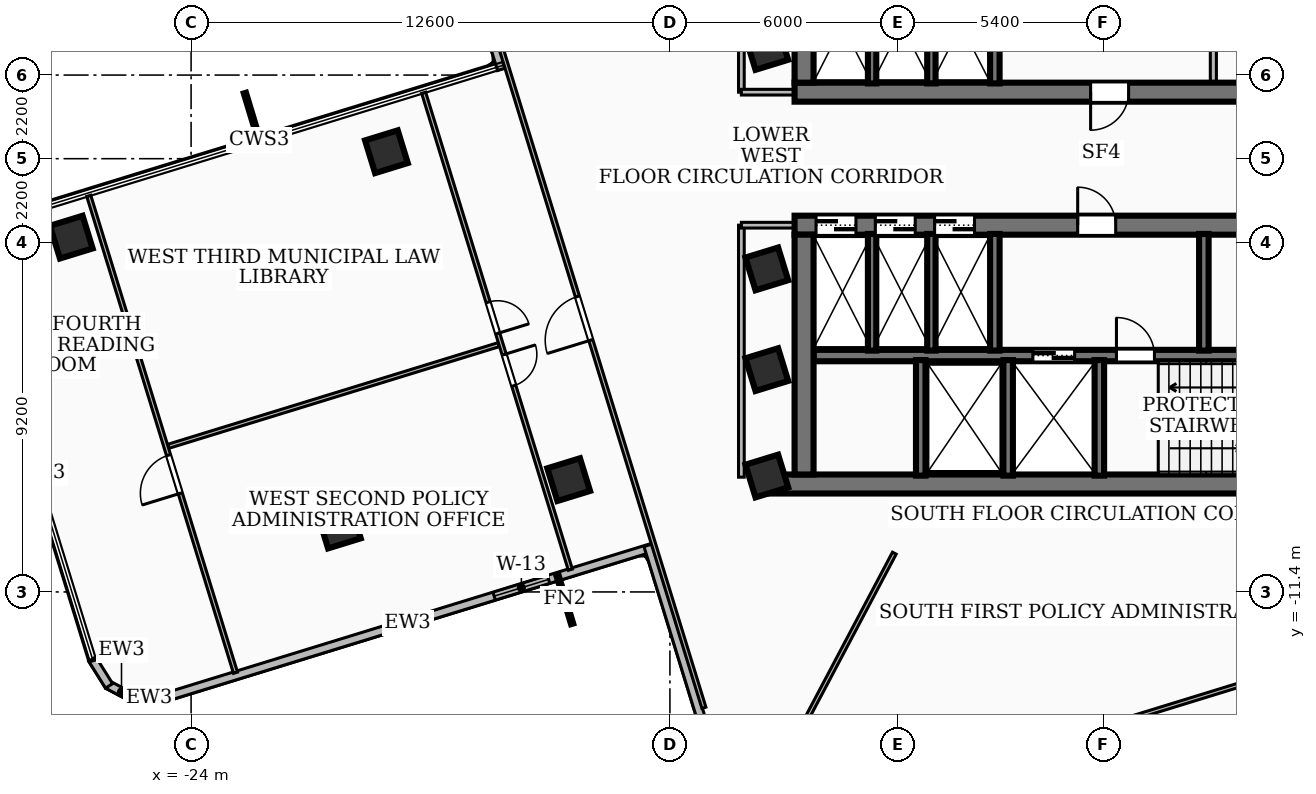
"""IFC4 building model, lengths in metres.
Left out: names, types, materials, properties, quantities, classifications, styles, units other than length and angle.
Written with IfcOpenShell. Run it as: python <this file> out.ifc"""

import sys

from ifc_helpers import new_model, si_unit, direction, frame, frame_2d, origin, origin_2d, place, context, subcontext, project, spatial, rectangle, extrude, element, fill, save


model = new_model("IFC4")
c1 = context("Model", 3, precision=1e-05, world=origin(), true_north=direction((0.0, 1.0)))
c2 = subcontext(c1, "Body", "Model", "MODEL_VIEW")
j1 = project(units=[si_unit("LENGTHUNIT", "METRE"), si_unit("PLANEANGLEUNIT", "RADIAN")], contexts=[c1])
p1 = place(None, origin())
s1 = spatial("IfcSite", under=j1, at=p1, CompositionType="ELEMENT")
p2 = place(p1, origin())
s2 = spatial("IfcBuilding", under=s1, at=p2, CompositionType="ELEMENT")
p3 = place(p2, frame((0.0, 0.0, 148.68)))
s3 = spatial("IfcBuildingStorey", under=s2, at=p3, CompositionType="ELEMENT", Elevation=148.68)
p4 = place(p3, frame((8.12, 1.75, 0.0), z_axis=(0.0, 0.0, 1.0), x_axis=(-1.0, 0.0, 0.0)))
e1 = element("IfcWall", 1, at=p4, inside=s3, PredefinedType="SHEAR", context=c2, shape_type="SweptSolid", body=[
    extrude(rectangle(XDim=16.24, YDim=0.5, at=frame_2d((8.12, 0.0))), origin(), (0.0, 0.0, 1.0), 3.32),
])
p5 = place(p4, frame((7.45, 0.0, 0.0)))
e2 = element("IfcOpeningElement", 2, at=p5, cuts=e1, PredefinedType="OPENING", context=c2, shape_type="SweptSolid", body=[
    extrude(rectangle(XDim=1.0, YDim=2.1, at=frame_2d((0.5, 1.05))), frame((0.0, 0.26, 0.0), z_axis=(0.0, -1.0, 0.0), x_axis=(1.0, 0.0, 0.0)), (0.0, 0.0, 1.0), 0.52),
])
p6 = place(p4, frame((3.4, 0.0, 0.0)))
e3 = element("IfcOpeningElement", 3, at=p6, cuts=e1, PredefinedType="OPENING", context=c2, shape_type="SweptSolid", body=[
    extrude(rectangle(XDim=0.9, YDim=2.06, at=frame_2d((0.45, 1.03))), frame((0.0, 0.26, 0.0), z_axis=(0.0, -1.0, 0.0), x_axis=(1.0, 0.0, 0.0)), (0.0, 0.0, 1.0), 0.52),
])
p7 = place(p4, frame((1.1, 0.0, 0.0)))
e4 = element("IfcOpeningElement", 4, at=p7, cuts=e1, PredefinedType="OPENING", context=c2, shape_type="SweptSolid", body=[
    extrude(rectangle(XDim=0.9, YDim=2.06, at=frame_2d((0.45, 1.03))), frame((0.0, 0.26, 0.0), z_axis=(0.0, -1.0, 0.0), x_axis=(1.0, 0.0, 0.0)), (0.0, 0.0, 1.0), 0.52),
])
p8 = place(p3, frame((-7.87, 2.0, 0.0), z_axis=(0.0, 0.0, 1.0), x_axis=(0.0, 1.0, 0.0)))
e5 = element("IfcWall", 5, at=p8, inside=s3, PredefinedType="SHEAR", context=c2, shape_type="SweptSolid", body=[
    extrude(rectangle(XDim=6.31, YDim=0.5, at=frame_2d((3.155, 0.0))), origin(), (0.0, 0.0, 1.0), 3.32),
])
p9 = place(p3, frame((8.78, -8.56, 0.0), z_axis=(0.0, 0.0, 1.0), x_axis=(-1.0, 0.0, 0.0)))
e6 = element("IfcWall", 6, at=p9, inside=s3, PredefinedType="SHEAR", context=c2, shape_type="SweptSolid", body=[
    extrude(rectangle(XDim=17.56, YDim=0.5, at=frame_2d((8.78, 0.0))), origin(), (0.0, 0.0, 1.0), 3.32),
])
p10 = place(p3, frame((-8.12, -1.75, 0.0), z_axis=(0.0, 0.0, 1.0), x_axis=(1.0, 0.0, 0.0)))
e7 = element("IfcWall", 7, at=p10, inside=s3, PredefinedType="SHEAR", context=c2, shape_type="SweptSolid", body=[
    extrude(rectangle(XDim=16.24, YDim=0.5, at=frame_2d((8.12, 0.0))), origin(), (0.0, 0.0, 1.0), 3.32),
])
p11 = place(p10, frame((7.45, 0.0, 0.0)))
e8 = element("IfcOpeningElement", 8, at=p11, cuts=e7, PredefinedType="OPENING", context=c2, shape_type="SweptSolid", body=[
    extrude(rectangle(XDim=1.0, YDim=2.1, at=frame_2d((0.5, 1.05))), frame((0.0, 0.26, 0.0), z_axis=(0.0, -1.0, 0.0), x_axis=(1.0, 0.0, 0.0)), (0.0, 0.0, 1.0), 0.52),
])
p12 = place(p10, frame((12.65, 0.0, 0.0)))
e9 = element("IfcOpeningElement", 9, at=p12, cuts=e7, PredefinedType="OPENING", context=c2, shape_type="SweptSolid", body=[
    extrude(rectangle(XDim=0.9, YDim=2.06, at=frame_2d((0.45, 1.03))), frame((0.0, 0.26, 0.0), z_axis=(0.0, -1.0, 0.0), x_axis=(1.0, 0.0, 0.0)), (0.0, 0.0, 1.0), 0.52),
])
p13 = place(p10, frame((0.565, 0.0, 0.0)))
e10 = element("IfcOpeningElement", 10, at=p13, cuts=e7, PredefinedType="OPENING", context=c2, shape_type="SweptSolid", body=[
    extrude(rectangle(XDim=1.05, YDim=2.15, at=frame_2d((0.525, 1.075))), frame((0.0, 0.26, 0.0), z_axis=(0.0, -1.0, 0.0), x_axis=(1.0, 0.0, 0.0)), (0.0, 0.0, 1.0), 0.52),
])
p14 = place(p10, frame((2.125, 0.0, 0.0)))
e11 = element("IfcOpeningElement", 11, at=p14, cuts=e7, PredefinedType="OPENING", context=c2, shape_type="SweptSolid", body=[
    extrude(rectangle(XDim=1.05, YDim=2.15, at=frame_2d((0.525, 1.075))), frame((0.0, 0.26, 0.0), z_axis=(0.0, -1.0, 0.0), x_axis=(1.0, 0.0, 0.0)), (0.0, 0.0, 1.0), 0.52),
])
p15 = place(p10, frame((3.685, 0.0, 0.0)))
e12 = element("IfcOpeningElement", 12, at=p15, cuts=e7, PredefinedType="OPENING", context=c2, shape_type="SweptSolid", body=[
    extrude(rectangle(XDim=1.05, YDim=2.15, at=frame_2d((0.525, 1.075))), frame((0.0, 0.26, 0.0), z_axis=(0.0, -1.0, 0.0), x_axis=(1.0, 0.0, 0.0)), (0.0, 0.0, 1.0), 0.52),
])
p16 = place(p3, frame((-7.87, -8.31, 0.0), z_axis=(0.0, 0.0, 1.0), x_axis=(0.0, 1.0, 0.0)))
e13 = element("IfcWall", 13, at=p16, inside=s3, PredefinedType="SHEAR", context=c2, shape_type="SweptSolid", body=[
    extrude(rectangle(XDim=6.31, YDim=0.5, at=frame_2d((3.155, 0.0))), origin(), (0.0, 0.0, 1.0), 3.32),
])
p17 = place(p3, frame((-7.62, -5.18, 0.0), z_axis=(0.0, 0.0, 1.0), x_axis=(1.0, 0.0, 0.0)))
e14 = element("IfcWall", 14, at=p17, inside=s3, PredefinedType="SOLIDWALL", context=c2, shape_type="SweptSolid", body=[
    extrude(rectangle(XDim=15.24, YDim=0.3, at=frame_2d((7.62, 0.0))), origin(), (0.0, 0.0, 1.0), 3.32),
])
p18 = place(p17, frame((5.77, 0.0, 0.0)))
e15 = element("IfcOpeningElement", 15, at=p18, cuts=e14, PredefinedType="OPENING", context=c2, shape_type="SweptSolid", body=[
    extrude(rectangle(XDim=1.1, YDim=2.15, at=frame_2d((0.55, 1.075))), frame((0.0, 0.16, 0.0), z_axis=(0.0, -1.0, 0.0), x_axis=(1.0, 0.0, 0.0)), (0.0, 0.0, 1.0), 0.32),
])
p19 = place(p17, frame((7.97, 0.0, 0.0)))
e16 = element("IfcOpeningElement", 16, at=p19, cuts=e14, PredefinedType="OPENING", context=c2, shape_type="SweptSolid", body=[
    extrude(rectangle(XDim=1.0, YDim=2.1, at=frame_2d((0.5, 1.05))), frame((0.0, 0.16, 0.0), z_axis=(0.0, -1.0, 0.0), x_axis=(1.0, 0.0, 0.0)), (0.0, 0.0, 1.0), 0.32),
])
p20 = place(p3, frame((-2.85, 1.98, 0.0), z_axis=(0.0, 0.0, 1.0), x_axis=(0.0, 1.0, 0.0)))
e17 = element("IfcWall", 17, at=p20, inside=s3, PredefinedType="SOLIDWALL", context=c2, shape_type="SweptSolid", body=[
    extrude(rectangle(XDim=3.07, YDim=0.25, at=frame_2d((1.535, 0.0))), origin(), (0.0, 0.0, 1.0), 3.32),
])
for number, where, z_axis, x_axis in (
    (18, (-0.1, -8.34, 0.0), (0.0, 0.0, 1.0), (0.0, 1.0, 0.0)),
    (19, (-2.5, -8.34, 0.0), (0.0, 0.0, 1.0), (0.0, 1.0, 0.0)),
    (20, (-4.8, -8.34, 0.0), (0.0, 0.0, 1.0), (0.0, 1.0, 0.0)),
):
    element("IfcWall", number, at=place(p3, frame(where, z_axis=z_axis, x_axis=x_axis)), inside=s3, PredefinedType="SOLIDWALL", context=c2, shape_type="SweptSolid", body=[
        extrude(rectangle(XDim=3.04, YDim=0.25, at=frame_2d((1.52, 0.0))), origin(), (0.0, 0.0, 1.0), 3.32),
    ])
for number, where, z_axis, x_axis in (
    (21, (-2.85, -5.05, 0.0), (0.0, 0.0, 1.0), (0.0, 1.0, 0.0)),
    (22, (2.65, -5.05, 0.0), (0.0, 0.0, 1.0), (0.0, 1.0, 0.0)),
):
    element("IfcWall", number, at=place(p3, frame(where, z_axis=z_axis, x_axis=x_axis)), inside=s3, PredefinedType="SOLIDWALL", context=c2, shape_type="SweptSolid", body=[
        extrude(rectangle(XDim=3.07, YDim=0.25, at=frame_2d((1.535, 0.0))), origin(), (0.0, 0.0, 1.0), 3.32),
    ])
for number, where, z_axis, x_axis in (
    (23, (-6.08, 1.98, 0.0), (0.0, 0.0, 1.0), (0.0, 1.0, 0.0)),
    (24, (-4.52, 1.98, 0.0), (0.0, 0.0, 1.0), (0.0, 1.0, 0.0)),
    (25, (-6.08, -5.05, 0.0), (0.0, 0.0, 1.0), (0.0, 1.0, 0.0)),
    (26, (-4.52, -5.05, 0.0), (0.0, 0.0, 1.0), (0.0, 1.0, 0.0)),
):
    element("IfcWall", number, at=place(p3, frame(where, z_axis=z_axis, x_axis=x_axis)), inside=s3, PredefinedType="SOLIDWALL", context=c2, shape_type="SweptSolid", body=[
        extrude(rectangle(XDim=3.07, YDim=0.22, at=frame_2d((1.535, 0.0))), origin(), (0.0, 0.0, 1.0), 3.32),
    ])
for number, where, z_axis, x_axis in (
    (27, (-8.85, -5.55, 0.0), (0.0, 0.0, 1.0), (0.956, 0.294, 0.0)),
    (28, (-8.85, -2.9, 0.0), (0.0, 0.0, 1.0), (0.956, 0.294, 0.0)),
    (29, (-8.85, 2.9, 0.0), (0.0, 0.0, 1.0), (0.956, 0.294, 0.0)),
    (30, (-8.85, -8.35, 0.0), (0.0, 0.0, 1.0), (0.956, 0.294, 0.0)),
    (31, (-18.86, 0.183, 0.0), (0.0, 0.0, 1.0), (0.956, 0.294, 0.0)),
    (32, (-14.064, -8.445, 0.0), (0.0, 0.0, 1.0), (0.956, 0.294, 0.0)),
    (33, (-27.153, -2.064, 0.0), (0.0, 0.0, 1.0), (0.956, 0.294, 0.0)),
    (34, (-20.098, -9.692, 0.0), (0.0, 0.0, 1.0), (0.956, 0.294, 0.0)),
):
    element("IfcColumn", number, at=place(p3, frame(where, z_axis=z_axis, x_axis=x_axis)), inside=s3, PredefinedType="COLUMN", context=c2, shape_type="SweptSolid", body=[
        extrude(rectangle(XDim=0.9, YDim=0.9, at=origin_2d()), origin(), (0.0, 0.0, 1.0), 3.6),
    ])
p21 = place(p3, frame((-11.868, -10.232, 0.0), z_axis=(0.0, 0.0, 1.0), x_axis=(-0.955802538335, -0.29400936671, 0.0)))
e35 = element("IfcWall", 35, at=p21, inside=s3, PredefinedType="SOLIDWALL", context=c2, shape_type="SweptSolid", body=[
    extrude(rectangle(XDim=13.459, YDim=0.22, at=frame_2d((6.729, 0.0))), origin(), (0.0, 0.0, 1.0), 3.32),
])
p22 = place(p21, frame((2.85, 0.0, 0.85)))
e36 = element("IfcOpeningElement", 36, at=p22, cuts=e35, PredefinedType="OPENING", context=c2, shape_type="SweptSolid", body=[
    extrude(rectangle(XDim=1.5, YDim=1.8, at=frame_2d((0.75, 0.9))), frame((0.0, 0.12, 0.0), z_axis=(0.0, -1.0, 0.0), x_axis=(1.0, 0.0, 0.0)), (0.0, 0.0, 1.0), 0.24),
])
p23 = place(p3, frame((-24.683, -14.181, 0.0), z_axis=(0.0, 0.0, 1.0), x_axis=(-0.999307996296, -0.037195813461, 0.0)))
e37 = element("IfcWall", 37, at=p23, inside=s3, PredefinedType="SOLIDWALL", context=c2, shape_type="SweptSolid", body=[
    extrude(rectangle(XDim=0.833, YDim=0.22, at=frame_2d((0.417, 0.0))), origin(), (0.0, 0.0, 1.0), 3.32),
])
p24 = place(p3, frame((-25.469, -14.223, 0.0), z_axis=(0.0, 0.0, 1.0), x_axis=(-0.883570434709, 0.468298288389, 0.0)))
e38 = element("IfcWall", 38, at=p24, inside=s3, PredefinedType="SOLIDWALL", context=c2, shape_type="SweptSolid", body=[
    extrude(rectangle(XDim=0.82, YDim=0.22, at=frame_2d((0.41, 0.0))), origin(), (0.0, 0.0, 1.0), 3.32),
])
p25 = place(p3, frame((-26.158, -13.872, 0.0), z_axis=(0.0, 0.0, 1.0), x_axis=(-0.531050540535, 0.847340146221, 0.0)))
e39 = element("IfcWall", 39, at=p25, inside=s3, PredefinedType="SOLIDWALL", context=c2, shape_type="SweptSolid", body=[
    extrude(rectangle(XDim=0.834, YDim=0.22, at=frame_2d((0.417, 0.0))), origin(), (0.0, 0.0, 1.0), 3.32),
])
p26 = place(p3, frame((-15.831, 2.351, 0.0), z_axis=(0.0, 0.0, 1.0), x_axis=(-0.293958424126, 0.955818207028, 0.0)))
e40 = element("IfcWall", 40, at=p26, inside=s3, PredefinedType="SOLIDWALL", context=c2, shape_type="SweptSolid", body=[
    extrude(rectangle(XDim=6.059, YDim=0.22, at=frame_2d((3.029, 0.0))), origin(), (0.0, 0.0, 1.0), 3.32),
])
p27 = place(p3, frame((-9.991, -16.634, 0.0), z_axis=(0.0, 0.0, 1.0), x_axis=(-0.294002082259, 0.955804779036, 0.0)))
e41 = element("IfcWall", 41, at=p27, inside=s3, PredefinedType="SOLIDWALL", context=c2, shape_type="SweptSolid", body=[
    extrude(rectangle(XDim=6.759, YDim=0.22, at=frame_2d((3.379, 0.0))), origin(), (0.0, 0.0, 1.0), 3.32),
])
p28 = place(p3, frame((2.9, 2.04, 0.0), z_axis=(0.0, 0.0, 1.0), x_axis=(0.0, 1.0, 0.0)))
e42 = element("IfcWall", 42, at=p28, inside=s3, PredefinedType="PARTITIONING", context=c2, shape_type="SweptSolid", body=[
    extrude(rectangle(XDim=2.94, YDim=0.16, at=frame_2d((1.47, 0.0))), origin(), (0.0, 0.0, 1.0), 2.55),
])
p29 = place(p28, frame((1.82, 0.0, 0.0)))
e43 = element("IfcOpeningElement", 43, at=p29, cuts=e42, PredefinedType="OPENING", context=c2, shape_type="SweptSolid", body=[
    extrude(rectangle(XDim=0.9, YDim=2.06, at=frame_2d((0.45, 1.03))), frame((0.0, 0.09, 0.0), z_axis=(0.0, -1.0, 0.0), x_axis=(1.0, 0.0, 0.0)), (0.0, 0.0, 1.0), 0.18),
])
p30 = place(p3, frame((-9.52, 1.75, 0.0), z_axis=(0.0, 0.0, 1.0), x_axis=(0.0, 1.0, 0.0)))
e44 = element("IfcWall", 44, at=p30, inside=s3, PredefinedType="PARTITIONING", context=c2, shape_type="SweptSolid", body=[
    extrude(rectangle(XDim=6.63, YDim=0.15, at=frame_2d((3.315, 0.0))), origin(), (0.0, 0.0, 1.0), 2.55),
])
p31 = place(p3, frame((-7.85, 1.75, 0.0), z_axis=(0.0, 0.0, 1.0), x_axis=(-1.0, 0.0, 0.0)))
e45 = element("IfcWall", 45, at=p31, inside=s3, PredefinedType="PARTITIONING", context=c2, shape_type="SweptSolid", body=[
    extrude(rectangle(XDim=1.67, YDim=0.15, at=frame_2d((0.835, 0.0))), origin(), (0.0, 0.0, 1.0), 2.55),
])
p32 = place(p3, frame((-9.52, -8.38, 0.0), z_axis=(0.0, 0.0, 1.0), x_axis=(0.0, 1.0, 0.0)))
e46 = element("IfcWall", 46, at=p32, inside=s3, PredefinedType="PARTITIONING", context=c2, shape_type="SweptSolid", body=[
    extrude(rectangle(XDim=6.63, YDim=0.15, at=frame_2d((3.315, 0.0))), origin(), (0.0, 0.0, 1.0), 2.55),
])
p33 = place(p3, frame((-7.85, -1.75, 0.0), z_axis=(0.0, 0.0, 1.0), x_axis=(-1.0, 0.0, 0.0)))
e47 = element("IfcWall", 47, at=p33, inside=s3, PredefinedType="PARTITIONING", context=c2, shape_type="SweptSolid", body=[
    extrude(rectangle(XDim=1.67, YDim=0.15, at=frame_2d((0.835, 0.0))), origin(), (0.0, 0.0, 1.0), 2.55),
])
p34 = place(p3, frame((-5.495, -10.38, 0.0), z_axis=(0.0, 0.0, 1.0), x_axis=(-0.467965518706, -0.883746724635, 0.0)))
e48 = element("IfcWall", 48, at=p34, inside=s3, PredefinedType="PARTITIONING", context=c2, shape_type="SweptSolid", body=[
    extrude(rectangle(XDim=7.93, YDim=0.11, at=frame_2d((3.965, 0.0))), origin(), (0.0, 0.0, 1.0), 2.55),
])
p35 = place(p3, frame((-10.506, -14.447, 0.0), z_axis=(0.0, 0.0, 1.0), x_axis=(-0.294033732643, 0.955795042919, 0.0)))
e49 = element("IfcWall", 49, at=p35, inside=s3, PredefinedType="PARTITIONING", context=c2, shape_type="SweptSolid", body=[
    extrude(rectangle(XDim=20.739, YDim=0.11, at=frame_2d((10.369, 0.0))), origin(), (0.0, 0.0, 1.0), 2.55),
])
p36 = place(p35, frame((10.12, 0.0, 0.0)))
e50 = element("IfcOpeningElement", 50, at=p36, cuts=e49, PredefinedType="OPENING", context=c2, shape_type="SweptSolid", body=[
    extrude(rectangle(XDim=1.2, YDim=2.1, at=frame_2d((0.6, 1.05))), frame((0.0, 0.065, 0.0), z_axis=(0.0, -1.0, 0.0), x_axis=(1.0, 0.0, 0.0)), (0.0, 0.0, 1.0), 0.13),
])
p37 = place(p3, frame((-15.904, -4.893, 0.0), z_axis=(0.0, 0.0, 1.0), x_axis=(-0.955787709154, -0.294057570944, 0.0)))
e51 = element("IfcWall", 51, at=p37, inside=s3, PredefinedType="PARTITIONING", context=c2, shape_type="SweptSolid", body=[
    extrude(rectangle(XDim=9.1, YDim=0.11, at=frame_2d((4.55, 0.0))), origin(), (0.0, 0.0, 1.0), 2.812),
])
p38 = place(p3, frame((-17.88, 1.734, 0.0), z_axis=(0.0, 0.0, 1.0), x_axis=(0.293994377882, -0.95580714884, 0.0)))
e52 = element("IfcWall", 52, at=p38, inside=s3, PredefinedType="PARTITIONING", context=c2, shape_type="SweptSolid", body=[
    extrude(rectangle(XDim=13.129, YDim=0.11, at=frame_2d((6.564, 0.0))), origin(), (0.0, 0.0, 1.0), 2.55),
])
p39 = place(p38, frame((5.765, 0.0, 0.0)))
e53 = element("IfcOpeningElement", 53, at=p39, cuts=e52, PredefinedType="OPENING", context=c2, shape_type="SweptSolid", body=[
    extrude(rectangle(XDim=0.86, YDim=2.04, at=frame_2d((0.43, 1.02))), frame((0.0, 0.065, 0.0), z_axis=(0.0, -1.0, 0.0), x_axis=(1.0, 0.0, 0.0)), (0.0, 0.0, 1.0), 0.13),
])
p40 = place(p38, frame((7.205, 0.0, 0.0)))
e54 = element("IfcOpeningElement", 54, at=p40, cuts=e52, PredefinedType="OPENING", context=c2, shape_type="SweptSolid", body=[
    extrude(rectangle(XDim=0.86, YDim=2.04, at=frame_2d((0.43, 1.02))), frame((0.0, 0.065, 0.0), z_axis=(0.0, -1.0, 0.0), x_axis=(1.0, 0.0, 0.0)), (0.0, 0.0, 1.0), 0.13),
])
p41 = place(p3, frame((-22.832, -13.526, 0.0), z_axis=(0.0, 0.0, 1.0), x_axis=(-0.294079315466, 0.955781018966, 0.0)))
e55 = element("IfcWall", 55, at=p41, inside=s3, PredefinedType="PARTITIONING", context=c2, shape_type="SweptSolid", body=[
    extrude(rectangle(XDim=13.129, YDim=0.11, at=frame_2d((6.565, 0.0))), origin(), (0.0, 0.0, 1.0), 2.55),
])
p42 = place(p41, frame((4.94, 0.0, 0.0)))
e56 = element("IfcOpeningElement", 56, at=p42, cuts=e55, PredefinedType="OPENING", context=c2, shape_type="SweptSolid", body=[
    extrude(rectangle(XDim=1.05, YDim=2.08, at=frame_2d((0.525, 1.04))), frame((0.0, 0.065, 0.0), z_axis=(0.0, -1.0, 0.0), x_axis=(1.0, 0.0, 0.0)), (0.0, 0.0, 1.0), 0.13),
])
p43 = place(p3, frame((14.447, -10.506, 0.0), z_axis=(0.0, 0.0, 1.0), x_axis=(-0.955795042919, -0.294033732643, 0.0)))
e57 = element("IfcWall", 57, at=p43, inside=s3, PredefinedType="PARTITIONING", context=c2, shape_type="SweptSolid", body=[
    extrude(rectangle(XDim=20.739, YDim=0.11, at=frame_2d((10.369, 0.0))), origin(), (0.0, 0.0, 1.0), 2.55),
])
p44 = place(p43, frame((10.12, 0.0, 0.0)))
e58 = element("IfcOpeningElement", 58, at=p44, cuts=e57, PredefinedType="OPENING", context=c2, shape_type="SweptSolid", body=[
    extrude(rectangle(XDim=1.2, YDim=2.1, at=frame_2d((0.6, 1.05))), frame((0.0, 0.065, 0.0), z_axis=(0.0, -1.0, 0.0), x_axis=(1.0, 0.0, 0.0)), (0.0, 0.0, 1.0), 0.13),
])
p45 = place(p22, origin())
e59 = element("IfcWindow", 59, at=p45, inside=s3, PartitioningType="SINGLE_PANEL", PredefinedType="WINDOW", context=c2, shape_type="SweptSolid", body=[
    extrude(rectangle(XDim=1.5, YDim=1.8, at=frame_2d((0.75, 0.9))), frame((0.0, 0.03, 0.0), z_axis=(0.0, -1.0, 0.0), x_axis=(1.0, 0.0, 0.0)), (0.0, 0.0, 1.0), 0.06),
])
fill(e36, e59)
p46 = place(p5, origin())
e60 = element("IfcDoor", 60, at=p46, inside=s3, OperationType="SINGLE_SWING_RIGHT", PredefinedType="DOOR", context=c2, shape_type="SweptSolid", body=[
    extrude(rectangle(XDim=1.0, YDim=2.1, at=frame_2d((0.5, 1.05))), frame((0.0, 0.025, 0.0), z_axis=(0.0, -1.0, 0.0), x_axis=(1.0, 0.0, 0.0)), (0.0, 0.0, 1.0), 0.05),
])
fill(e2, e60)
p47 = place(p11, origin())
e61 = element("IfcDoor", 61, at=p47, inside=s3, OperationType="SINGLE_SWING_LEFT", PredefinedType="DOOR", context=c2, shape_type="SweptSolid", body=[
    extrude(rectangle(XDim=1.0, YDim=2.1, at=frame_2d((0.5, 1.05))), frame((0.0, 0.025, 0.0), z_axis=(0.0, -1.0, 0.0), x_axis=(1.0, 0.0, 0.0)), (0.0, 0.0, 1.0), 0.05),
])
fill(e8, e61)
p48 = place(p18, origin())
e62 = element("IfcDoor", 62, at=p48, inside=s3, OperationType="DOUBLE_DOOR_SLIDING", PredefinedType="DOOR", context=c2, shape_type="SweptSolid", body=[
    extrude(rectangle(XDim=1.1, YDim=2.15, at=frame_2d((0.55, 1.075))), frame((0.0, 0.025, 0.0), z_axis=(0.0, -1.0, 0.0), x_axis=(1.0, 0.0, 0.0)), (0.0, 0.0, 1.0), 0.05),
])
fill(e15, e62)
p49 = place(p19, origin())
e63 = element("IfcDoor", 63, at=p49, inside=s3, OperationType="SINGLE_SWING_LEFT", PredefinedType="DOOR", context=c2, shape_type="SweptSolid", body=[
    extrude(rectangle(XDim=1.0, YDim=2.1, at=frame_2d((0.5, 1.05))), frame((0.0, 0.025, 0.0), z_axis=(0.0, -1.0, 0.0), x_axis=(1.0, 0.0, 0.0)), (0.0, 0.0, 1.0), 0.05),
])
fill(e16, e63)
p50 = place(p13, origin())
e64 = element("IfcDoor", 64, at=p50, inside=s3, OperationType="DOUBLE_DOOR_SLIDING", PredefinedType="DOOR", context=c2, shape_type="SweptSolid", body=[
    extrude(rectangle(XDim=1.05, YDim=2.15, at=frame_2d((0.525, 1.075))), frame((0.0, 0.025, 0.0), z_axis=(0.0, -1.0, 0.0), x_axis=(1.0, 0.0, 0.0)), (0.0, 0.0, 1.0), 0.05),
])
fill(e10, e64)
p51 = place(p14, origin())
e65 = element("IfcDoor", 65, at=p51, inside=s3, OperationType="DOUBLE_DOOR_SLIDING", PredefinedType="DOOR", context=c2, shape_type="SweptSolid", body=[
    extrude(rectangle(XDim=1.05, YDim=2.15, at=frame_2d((0.525, 1.075))), frame((0.0, 0.025, 0.0), z_axis=(0.0, -1.0, 0.0), x_axis=(1.0, 0.0, 0.0)), (0.0, 0.0, 1.0), 0.05),
])
fill(e11, e65)
p52 = place(p15, origin())
e66 = element("IfcDoor", 66, at=p52, inside=s3, OperationType="DOUBLE_DOOR_SLIDING", PredefinedType="DOOR", context=c2, shape_type="SweptSolid", body=[
    extrude(rectangle(XDim=1.05, YDim=2.15, at=frame_2d((0.525, 1.075))), frame((0.0, 0.025, 0.0), z_axis=(0.0, -1.0, 0.0), x_axis=(1.0, 0.0, 0.0)), (0.0, 0.0, 1.0), 0.05),
])
fill(e12, e66)
p53 = place(p36, origin())
e67 = element("IfcDoor", 67, at=p53, inside=s3, OperationType="SINGLE_SWING_LEFT", PredefinedType="DOOR", context=c2, shape_type="SweptSolid", body=[
    extrude(rectangle(XDim=1.2, YDim=2.1, at=frame_2d((0.6, 1.05))), frame((0.0, 0.025, 0.0), z_axis=(0.0, -1.0, 0.0), x_axis=(1.0, 0.0, 0.0)), (0.0, 0.0, 1.0), 0.05),
])
fill(e50, e67)
p54 = place(p39, origin())
e68 = element("IfcDoor", 68, at=p54, inside=s3, OperationType="SINGLE_SWING_RIGHT", PredefinedType="DOOR", context=c2, shape_type="SweptSolid", body=[
    extrude(rectangle(XDim=0.86, YDim=2.04, at=frame_2d((0.43, 1.02))), frame((0.0, 0.025, 0.0), z_axis=(0.0, -1.0, 0.0), x_axis=(1.0, 0.0, 0.0)), (0.0, 0.0, 1.0), 0.05),
])
fill(e53, e68)
p55 = place(p40, origin())
e69 = element("IfcDoor", 69, at=p55, inside=s3, OperationType="SINGLE_SWING_LEFT", PredefinedType="DOOR", context=c2, shape_type="SweptSolid", body=[
    extrude(rectangle(XDim=0.86, YDim=2.04, at=frame_2d((0.43, 1.02))), frame((0.0, 0.025, 0.0), z_axis=(0.0, -1.0, 0.0), x_axis=(1.0, 0.0, 0.0)), (0.0, 0.0, 1.0), 0.05),
])
fill(e54, e69)
p56 = place(p42, origin())
e70 = element("IfcDoor", 70, at=p56, inside=s3, OperationType="SINGLE_SWING_LEFT", PredefinedType="DOOR", context=c2, shape_type="SweptSolid", body=[
    extrude(rectangle(XDim=1.05, YDim=2.08, at=frame_2d((0.525, 1.04))), frame((0.0, 0.025, 0.0), z_axis=(0.0, -1.0, 0.0), x_axis=(1.0, 0.0, 0.0)), (0.0, 0.0, 1.0), 0.05),
])
fill(e56, e70)
save(model, sys.argv[1])
